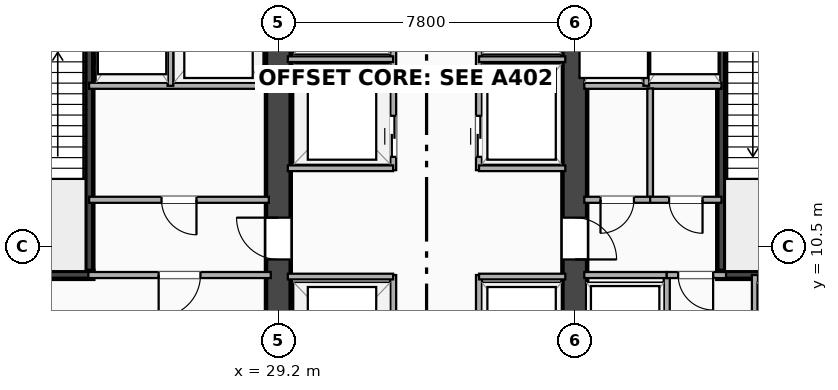
"""IFC4 building model, lengths in metres.
Left out: names, types, materials, properties, quantities, classifications, styles, units other than length and angle.
Written with IfcOpenShell. Run it as: python <this file> out.ifc"""

import sys

from ifc_helpers import new_model, si_unit, direction, frame, frame_2d, origin, place, context, subcontext, project, spatial, rectangle, extrude, element, fill, save


model = new_model("IFC4")
c1 = context("Model", 3, precision=1e-05, world=origin(), true_north=direction((0.0, 1.0)))
c2 = subcontext(c1, "Body", "Model", "MODEL_VIEW")
j1 = project(units=[si_unit("LENGTHUNIT", "METRE"), si_unit("PLANEANGLEUNIT", "RADIAN")], contexts=[c1])
p1 = place(None, origin())
s1 = spatial("IfcSite", under=j1, at=p1, CompositionType="ELEMENT")
p2 = place(p1, origin())
s2 = spatial("IfcBuilding", under=s1, at=p2, CompositionType="ELEMENT")
p3 = place(p2, origin())
s3 = spatial("IfcBuildingStorey", under=s2, at=p3, CompositionType="ELEMENT", Elevation=0.0)
p4 = place(p3, frame((29.2, 3.5, 0.0), z_axis=(0.0, 0.0, 1.0), x_axis=(0.0, 1.0, 0.0)))
e1 = element("IfcWall", 1, at=p4, inside=s3, PredefinedType="SHEAR", context=c2, shape_type="SweptSolid", body=[
    extrude(rectangle(XDim=16.9, YDim=0.65, at=frame_2d((8.45, 0.0))), origin(), (0.0, 0.0, 1.0), 5.1),
])
p5 = place(p4, frame((7.75, 0.0, 0.0), z_axis=(0.0, 0.0, 1.0), x_axis=(-1.0, 0.0, 0.0)))
e2 = element("IfcOpeningElement", 2, at=p5, cuts=e1, PredefinedType="OPENING", context=c2, shape_type="SweptSolid", body=[
    extrude(rectangle(XDim=1.1, YDim=2.15, at=frame_2d((0.55, 1.075))), frame((0.0, 0.335, 0.0), z_axis=(0.0, -1.0, 0.0), x_axis=(1.0, 0.0, 0.0)), (0.0, 0.0, 1.0), 0.67),
])
p6 = place(p3, frame((37.0, 3.5, 0.0), z_axis=(0.0, 0.0, 1.0), x_axis=(0.0, 1.0, 0.0)))
e3 = element("IfcWall", 3, at=p6, inside=s3, PredefinedType="SHEAR", context=c2, shape_type="SweptSolid", body=[
    extrude(rectangle(XDim=16.9, YDim=0.65, at=frame_2d((8.45, 0.0))), origin(), (0.0, 0.0, 1.0), 5.1),
])
p7 = place(p6, frame((6.65, 0.0, 0.0)))
e4 = element("IfcOpeningElement", 4, at=p7, cuts=e3, PredefinedType="OPENING", context=c2, shape_type="SweptSolid", body=[
    extrude(rectangle(XDim=1.1, YDim=2.15, at=frame_2d((0.55, 1.075))), frame((0.0, 0.335, 0.0), z_axis=(0.0, -1.0, 0.0), x_axis=(1.0, 0.0, 0.0)), (0.0, 0.0, 1.0), 0.67),
])
p8 = place(p3, frame((24.225, 9.745, 0.0), z_axis=(0.0, 0.0, 1.0), x_axis=(0.0, 1.0, 0.0)))
e5 = element("IfcWall", 5, at=p8, inside=s3, PredefinedType="SHEAR", context=c2, shape_type="SweptSolid", body=[
    extrude(rectangle(XDim=8.01, YDim=0.21, at=frame_2d((4.005, 0.0))), origin(), (0.0, 0.0, 1.0), 5.1),
])
p9 = place(p3, frame((20.67, 9.745, 0.0), z_axis=(0.0, 0.0, 1.0), x_axis=(1.0, 0.0, 0.0)))
e6 = element("IfcWall", 6, at=p9, inside=s3, PredefinedType="SHEAR", context=c2, shape_type="SweptSolid", body=[
    extrude(rectangle(XDim=3.66, YDim=0.21, at=frame_2d((1.83, 0.0))), origin(), (0.0, 0.0, 1.0), 5.1),
])
p10 = place(p3, frame((40.855, 9.745, 0.0), z_axis=(0.0, 0.0, 1.0), x_axis=(0.0, 1.0, 0.0)))
e7 = element("IfcWall", 7, at=p10, inside=s3, PredefinedType="SHEAR", context=c2, shape_type="SweptSolid", body=[
    extrude(rectangle(XDim=8.01, YDim=0.21, at=frame_2d((4.005, 0.0))), origin(), (0.0, 0.0, 1.0), 5.1),
])
p11 = place(p3, frame((40.75, 9.745, 0.0), z_axis=(0.0, 0.0, 1.0), x_axis=(1.0, 0.0, 0.0)))
e8 = element("IfcWall", 8, at=p11, inside=s3, PredefinedType="SHEAR", context=c2, shape_type="SweptSolid", body=[
    extrude(rectangle(XDim=3.66, YDim=0.21, at=frame_2d((1.83, 0.0))), origin(), (0.0, 0.0, 1.0), 5.1),
])
p12 = place(p3, frame((24.22, 14.72, 0.0), z_axis=(0.0, 0.0, 1.0), x_axis=(1.0, 0.0, 0.0)))
e9 = element("IfcWall", 9, at=p12, inside=s3, PredefinedType="PARTITIONING", context=c2, shape_type="SweptSolid", body=[
    extrude(rectangle(XDim=4.73, YDim=0.16, at=frame_2d((2.365, 0.0))), origin(), (0.0, 0.0, 1.0), 4.23),
])
p13 = place(p3, frame((26.36, 14.72, 0.0), z_axis=(0.0, 0.0, 1.0), x_axis=(0.0, 1.0, 0.0)))
e10 = element("IfcWall", 10, at=p13, inside=s3, PredefinedType="PARTITIONING", context=c2, shape_type="SweptSolid", body=[
    extrude(rectangle(XDim=3.04, YDim=0.15, at=frame_2d((1.52, 0.0))), origin(), (0.0, 0.0, 1.0), 5.1),
])
p14 = place(p3, frame((37.25, 14.72, 0.0), z_axis=(0.0, 0.0, 1.0), x_axis=(1.0, 0.0, 0.0)))
e11 = element("IfcWall", 11, at=p14, inside=s3, PredefinedType="PARTITIONING", context=c2, shape_type="SweptSolid", body=[
    extrude(rectangle(XDim=3.61, YDim=0.16, at=frame_2d((1.805, 0.0))), origin(), (0.0, 0.0, 1.0), 4.23),
])
p15 = place(p3, frame((38.88, 14.72, 0.0), z_axis=(0.0, 0.0, 1.0), x_axis=(0.0, 1.0, 0.0)))
e12 = element("IfcWall", 12, at=p15, inside=s3, PredefinedType="PARTITIONING", context=c2, shape_type="SweptSolid", body=[
    extrude(rectangle(XDim=3.04, YDim=0.15, at=frame_2d((1.52, 0.0))), origin(), (0.0, 0.0, 1.0), 5.1),
])
p16 = place(p3, frame((24.22, 11.72, 0.0), z_axis=(0.0, 0.0, 1.0), x_axis=(1.0, 0.0, 0.0)))
e13 = element("IfcWall", 13, at=p16, inside=s3, PredefinedType="PARTITIONING", context=c2, shape_type="SweptSolid", body=[
    extrude(rectangle(XDim=4.73, YDim=0.16, at=frame_2d((2.365, 0.0))), origin(), (0.0, 0.0, 1.0), 4.23),
])
p17 = place(p16, frame((1.905, 0.0, 0.0)))
e14 = element("IfcOpeningElement", 14, at=p17, cuts=e13, PredefinedType="OPENING", context=c2, shape_type="SweptSolid", body=[
    extrude(rectangle(XDim=0.92, YDim=2.08, at=frame_2d((0.46, 1.04))), frame((0.0, 0.09, 0.0), z_axis=(0.0, -1.0, 0.0), x_axis=(1.0, 0.0, 0.0)), (0.0, 0.0, 1.0), 0.18),
])
p18 = place(p3, frame((38.983, 11.72, 0.0), z_axis=(0.0, 0.0, 1.0), x_axis=(0.0, 1.0, 0.0)))
e15 = element("IfcWall", 15, at=p18, inside=s3, PredefinedType="PARTITIONING", context=c2, shape_type="SweptSolid", body=[
    extrude(rectangle(XDim=2.93, YDim=0.15, at=frame_2d((1.465, 0.0))), origin(), (0.0, 0.0, 1.0), 5.1),
])
p19 = place(p3, frame((37.25, 11.72, 0.0), z_axis=(0.0, 0.0, 1.0), x_axis=(1.0, 0.0, 0.0)))
e16 = element("IfcWall", 16, at=p19, inside=s3, PredefinedType="PARTITIONING", context=c2, shape_type="SweptSolid", body=[
    extrude(rectangle(XDim=1.733, YDim=0.16, at=frame_2d((0.866, 0.0))), origin(), (0.0, 0.0, 1.0), 4.23),
])
p20 = place(p19, frame((0.427, 0.0, 0.0)))
e17 = element("IfcOpeningElement", 17, at=p20, cuts=e16, PredefinedType="OPENING", context=c2, shape_type="SweptSolid", body=[
    extrude(rectangle(XDim=0.88, YDim=2.08, at=frame_2d((0.44, 1.04))), frame((0.0, 0.09, 0.0), z_axis=(0.0, -1.0, 0.0), x_axis=(1.0, 0.0, 0.0)), (0.0, 0.0, 1.0), 0.18),
])
p21 = place(p3, frame((38.983, 11.72, 0.0), z_axis=(0.0, 0.0, 1.0), x_axis=(1.0, 0.0, 0.0)))
e18 = element("IfcWall", 18, at=p21, inside=s3, PredefinedType="PARTITIONING", context=c2, shape_type="SweptSolid", body=[
    extrude(rectangle(XDim=1.877, YDim=0.16, at=frame_2d((0.938, 0.0))), origin(), (0.0, 0.0, 1.0), 5.1),
])
p22 = place(p21, frame((0.499, 0.0, 0.0)))
e19 = element("IfcOpeningElement", 19, at=p22, cuts=e18, PredefinedType="OPENING", context=c2, shape_type="SweptSolid", body=[
    extrude(rectangle(XDim=0.88, YDim=2.08, at=frame_2d((0.44, 1.04))), frame((0.0, 0.09, 0.0), z_axis=(0.0, -1.0, 0.0), x_axis=(1.0, 0.0, 0.0)), (0.0, 0.0, 1.0), 0.18),
])
p23 = place(p3, frame((24.2, 9.74, 0.0), z_axis=(0.0, 0.0, 1.0), x_axis=(1.0, 0.0, 0.0)))
e20 = element("IfcWall", 20, at=p23, inside=s3, PredefinedType="PARTITIONING", context=c2, shape_type="SweptSolid", body=[
    extrude(rectangle(XDim=4.8, YDim=0.16, at=frame_2d((2.4, 0.0))), origin(), (0.0, 0.0, 1.0), 4.23),
])
p24 = place(p23, frame((1.85, 0.0, 0.0)))
e21 = element("IfcOpeningElement", 21, at=p24, cuts=e20, PredefinedType="OPENING", context=c2, shape_type="SweptSolid", body=[
    extrude(rectangle(XDim=1.1, YDim=2.15, at=frame_2d((0.55, 1.075))), frame((0.0, 0.09, 0.0), z_axis=(0.0, -1.0, 0.0), x_axis=(1.0, 0.0, 0.0)), (0.0, 0.0, 1.0), 0.18),
])
p25 = place(p3, frame((39.42, 3.9, 0.0), z_axis=(0.0, 0.0, 1.0), x_axis=(0.0, 1.0, 0.0)))
e22 = element("IfcWall", 22, at=p25, inside=s3, PredefinedType="PARTITIONING", context=c2, shape_type="SweptSolid", body=[
    extrude(rectangle(XDim=5.84, YDim=0.16, at=frame_2d((2.92, 0.0))), origin(), (0.0, 0.0, 1.0), 4.164),
])
p26 = place(p25, frame((1.86, 0.0, 0.0), z_axis=(0.0, 0.0, 1.0), x_axis=(-1.0, 0.0, 0.0)))
e23 = element("IfcOpeningElement", 23, at=p26, cuts=e22, PredefinedType="OPENING", context=c2, shape_type="SweptSolid", body=[
    extrude(rectangle(XDim=1.06, YDim=2.16, at=frame_2d((0.53, 1.08))), frame((0.0, 0.09, 0.0), z_axis=(0.0, -1.0, 0.0), x_axis=(1.0, 0.0, 0.0)), (0.0, 0.0, 1.0), 0.18),
])
p27 = place(p25, frame((4.76, 0.0, 0.0), z_axis=(0.0, 0.0, 1.0), x_axis=(-1.0, 0.0, 0.0)))
e24 = element("IfcOpeningElement", 24, at=p27, cuts=e22, PredefinedType="OPENING", context=c2, shape_type="SweptSolid", body=[
    extrude(rectangle(XDim=1.06, YDim=2.16, at=frame_2d((0.53, 1.08))), frame((0.0, 0.09, 0.0), z_axis=(0.0, -1.0, 0.0), x_axis=(1.0, 0.0, 0.0)), (0.0, 0.0, 1.0), 0.18),
])
p28 = place(p3, frame((41.74, 3.9, 0.0), z_axis=(0.0, 0.0, 1.0), x_axis=(0.0, 1.0, 0.0)))
e25 = element("IfcWall", 25, at=p28, inside=s3, PredefinedType="PARTITIONING", context=c2, shape_type="SweptSolid", body=[
    extrude(rectangle(XDim=5.84, YDim=0.16, at=frame_2d((2.92, 0.0))), origin(), (0.0, 0.0, 1.0), 4.164),
])
p29 = place(p28, frame((0.8, 0.0, 0.0)))
e26 = element("IfcOpeningElement", 26, at=p29, cuts=e25, PredefinedType="OPENING", context=c2, shape_type="SweptSolid", body=[
    extrude(rectangle(XDim=1.06, YDim=2.16, at=frame_2d((0.53, 1.08))), frame((0.0, 0.09, 0.0), z_axis=(0.0, -1.0, 0.0), x_axis=(1.0, 0.0, 0.0)), (0.0, 0.0, 1.0), 0.18),
])
p30 = place(p28, frame((3.7, 0.0, 0.0)))
e27 = element("IfcOpeningElement", 27, at=p30, cuts=e25, PredefinedType="OPENING", context=c2, shape_type="SweptSolid", body=[
    extrude(rectangle(XDim=1.06, YDim=2.16, at=frame_2d((0.53, 1.08))), frame((0.0, 0.09, 0.0), z_axis=(0.0, -1.0, 0.0), x_axis=(1.0, 0.0, 0.0)), (0.0, 0.0, 1.0), 0.18),
])
p31 = place(p3, frame((37.25, 9.74, 0.0), z_axis=(0.0, 0.0, 1.0), x_axis=(1.0, 0.0, 0.0)))
e28 = element("IfcWall", 28, at=p31, inside=s3, PredefinedType="PARTITIONING", context=c2, shape_type="SweptSolid", body=[
    extrude(rectangle(XDim=2.17, YDim=0.16, at=frame_2d((1.085, 0.0))), origin(), (0.0, 0.0, 1.0), 4.23),
])
p32 = place(p3, frame((39.42, 9.74, 0.0), z_axis=(0.0, 0.0, 1.0), x_axis=(1.0, 0.0, 0.0)))
e29 = element("IfcWall", 29, at=p32, inside=s3, PredefinedType="PARTITIONING", context=c2, shape_type="SweptSolid", body=[
    extrude(rectangle(XDim=1.56, YDim=0.16, at=frame_2d((0.78, 0.0))), origin(), (0.0, 0.0, 1.0), 5.1),
])
p33 = place(p32, frame((0.3, 0.0, 0.0)))
e30 = element("IfcOpeningElement", 30, at=p33, cuts=e29, PredefinedType="OPENING", context=c2, shape_type="SweptSolid", body=[
    extrude(rectangle(XDim=0.92, YDim=2.08, at=frame_2d((0.46, 1.04))), frame((0.0, 0.09, 0.0), z_axis=(0.0, -1.0, 0.0), x_axis=(1.0, 0.0, 0.0)), (0.0, 0.0, 1.0), 0.18),
])
p34 = place(p3, frame((32.22, 3.9, 0.0), z_axis=(0.0, 0.0, 1.0), x_axis=(0.0, 1.0, 0.0)))
e31 = element("IfcWall", 31, at=p34, inside=s3, PredefinedType="PARTITIONING", context=c2, shape_type="SweptSolid", body=[
    extrude(rectangle(XDim=5.84, YDim=0.16, at=frame_2d((2.92, 0.0))), origin(), (0.0, 0.0, 1.0), 4.164),
])
p35 = place(p34, frame((1.78, 0.0, 0.0), z_axis=(0.0, 0.0, 1.0), x_axis=(-1.0, 0.0, 0.0)))
e32 = element("IfcOpeningElement", 32, at=p35, cuts=e31, PredefinedType="OPENING", context=c2, shape_type="SweptSolid", body=[
    extrude(rectangle(XDim=1.08, YDim=2.16, at=frame_2d((0.54, 1.08))), frame((0.0, 0.09, 0.0), z_axis=(0.0, -1.0, 0.0), x_axis=(1.0, 0.0, 0.0)), (0.0, 0.0, 1.0), 0.18),
])
p36 = place(p34, frame((4.68, 0.0, 0.0), z_axis=(0.0, 0.0, 1.0), x_axis=(-1.0, 0.0, 0.0)))
e33 = element("IfcOpeningElement", 33, at=p36, cuts=e31, PredefinedType="OPENING", context=c2, shape_type="SweptSolid", body=[
    extrude(rectangle(XDim=1.08, YDim=2.16, at=frame_2d((0.54, 1.08))), frame((0.0, 0.09, 0.0), z_axis=(0.0, -1.0, 0.0), x_axis=(1.0, 0.0, 0.0)), (0.0, 0.0, 1.0), 0.18),
])
p37 = place(p3, frame((34.48, 3.9, 0.0), z_axis=(0.0, 0.0, 1.0), x_axis=(0.0, 1.0, 0.0)))
e34 = element("IfcWall", 34, at=p37, inside=s3, PredefinedType="PARTITIONING", context=c2, shape_type="SweptSolid", body=[
    extrude(rectangle(XDim=5.84, YDim=0.16, at=frame_2d((2.92, 0.0))), origin(), (0.0, 0.0, 1.0), 4.164),
])
p38 = place(p37, frame((0.7, 0.0, 0.0)))
e35 = element("IfcOpeningElement", 35, at=p38, cuts=e34, PredefinedType="OPENING", context=c2, shape_type="SweptSolid", body=[
    extrude(rectangle(XDim=1.08, YDim=2.16, at=frame_2d((0.54, 1.08))), frame((0.0, 0.09, 0.0), z_axis=(0.0, -1.0, 0.0), x_axis=(1.0, 0.0, 0.0)), (0.0, 0.0, 1.0), 0.18),
])
p39 = place(p37, frame((3.6, 0.0, 0.0)))
e36 = element("IfcOpeningElement", 36, at=p39, cuts=e34, PredefinedType="OPENING", context=c2, shape_type="SweptSolid", body=[
    extrude(rectangle(XDim=1.08, YDim=2.16, at=frame_2d((0.54, 1.08))), frame((0.0, 0.09, 0.0), z_axis=(0.0, -1.0, 0.0), x_axis=(1.0, 0.0, 0.0)), (0.0, 0.0, 1.0), 0.18),
])
p40 = place(p3, frame((29.45, 9.7, 0.0), z_axis=(0.0, 0.0, 1.0), x_axis=(1.0, 0.0, 0.0)))
e37 = element("IfcWall", 37, at=p40, inside=s3, PredefinedType="PARTITIONING", context=c2, shape_type="SweptSolid", body=[
    extrude(rectangle(XDim=2.77, YDim=0.15, at=frame_2d((1.385, 0.0))), origin(), (0.0, 0.0, 1.0), 4.23),
])
p41 = place(p3, frame((34.48, 9.7, 0.0), z_axis=(0.0, 0.0, 1.0), x_axis=(1.0, 0.0, 0.0)))
e38 = element("IfcWall", 38, at=p41, inside=s3, PredefinedType="PARTITIONING", context=c2, shape_type="SweptSolid", body=[
    extrude(rectangle(XDim=2.27, YDim=0.15, at=frame_2d((1.135, 0.0))), origin(), (0.0, 0.0, 1.0), 4.23),
])
p42 = place(p3, frame((32.22, 12.5, 0.0), z_axis=(0.0, 0.0, 1.0), x_axis=(0.0, 1.0, 0.0)))
e39 = element("IfcWall", 39, at=p42, inside=s3, PredefinedType="PARTITIONING", context=c2, shape_type="SweptSolid", body=[
    extrude(rectangle(XDim=7.92, YDim=0.16, at=frame_2d((3.96, 0.0))), origin(), (0.0, 0.0, 1.0), 4.164),
])
p43 = place(p42, frame((1.43, 0.0, 0.0), z_axis=(0.0, 0.0, 1.0), x_axis=(-1.0, 0.0, 0.0)))
e40 = element("IfcOpeningElement", 40, at=p43, cuts=e39, PredefinedType="OPENING", context=c2, shape_type="SweptSolid", body=[
    extrude(rectangle(XDim=1.08, YDim=2.16, at=frame_2d((0.54, 1.08))), frame((0.0, 0.09, 0.0), z_axis=(0.0, -1.0, 0.0), x_axis=(1.0, 0.0, 0.0)), (0.0, 0.0, 1.0), 0.18),
])
p44 = place(p42, frame((4.33, 0.0, 0.0), z_axis=(0.0, 0.0, 1.0), x_axis=(-1.0, 0.0, 0.0)))
e41 = element("IfcOpeningElement", 41, at=p44, cuts=e39, PredefinedType="OPENING", context=c2, shape_type="SweptSolid", body=[
    extrude(rectangle(XDim=1.08, YDim=2.16, at=frame_2d((0.54, 1.08))), frame((0.0, 0.09, 0.0), z_axis=(0.0, -1.0, 0.0), x_axis=(1.0, 0.0, 0.0)), (0.0, 0.0, 1.0), 0.18),
])
p45 = place(p42, frame((6.1, 0.0, 0.0)))
e42 = element("IfcOpeningElement", 42, at=p45, cuts=e39, PredefinedType="OPENING", context=c2, shape_type="SweptSolid", body=[
    extrude(rectangle(XDim=0.88, YDim=2.08, at=frame_2d((0.44, 1.04))), frame((0.0, 0.09, 0.0), z_axis=(0.0, -1.0, 0.0), x_axis=(1.0, 0.0, 0.0)), (0.0, 0.0, 1.0), 0.18),
])
p46 = place(p3, frame((34.48, 12.5, 0.0), z_axis=(0.0, 0.0, 1.0), x_axis=(0.0, 1.0, 0.0)))
e43 = element("IfcWall", 43, at=p46, inside=s3, PredefinedType="PARTITIONING", context=c2, shape_type="SweptSolid", body=[
    extrude(rectangle(XDim=7.92, YDim=0.16, at=frame_2d((3.96, 0.0))), origin(), (0.0, 0.0, 1.0), 4.164),
])
p47 = place(p46, frame((0.35, 0.0, 0.0)))
e44 = element("IfcOpeningElement", 44, at=p47, cuts=e43, PredefinedType="OPENING", context=c2, shape_type="SweptSolid", body=[
    extrude(rectangle(XDim=1.08, YDim=2.16, at=frame_2d((0.54, 1.08))), frame((0.0, 0.09, 0.0), z_axis=(0.0, -1.0, 0.0), x_axis=(1.0, 0.0, 0.0)), (0.0, 0.0, 1.0), 0.18),
])
p48 = place(p46, frame((3.25, 0.0, 0.0)))
e45 = element("IfcOpeningElement", 45, at=p48, cuts=e43, PredefinedType="OPENING", context=c2, shape_type="SweptSolid", body=[
    extrude(rectangle(XDim=1.08, YDim=2.16, at=frame_2d((0.54, 1.08))), frame((0.0, 0.09, 0.0), z_axis=(0.0, -1.0, 0.0), x_axis=(1.0, 0.0, 0.0)), (0.0, 0.0, 1.0), 0.18),
])
p49 = place(p46, frame((6.98, 0.0, 0.0), z_axis=(0.0, 0.0, 1.0), x_axis=(-1.0, 0.0, 0.0)))
e46 = element("IfcOpeningElement", 46, at=p49, cuts=e43, PredefinedType="OPENING", context=c2, shape_type="SweptSolid", body=[
    extrude(rectangle(XDim=0.88, YDim=2.08, at=frame_2d((0.44, 1.04))), frame((0.0, 0.09, 0.0), z_axis=(0.0, -1.0, 0.0), x_axis=(1.0, 0.0, 0.0)), (0.0, 0.0, 1.0), 0.18),
])
p50 = place(p3, frame((29.45, 12.55, 0.0), z_axis=(0.0, 0.0, 1.0), x_axis=(1.0, 0.0, 0.0)))
e47 = element("IfcWall", 47, at=p50, inside=s3, PredefinedType="PARTITIONING", context=c2, shape_type="SweptSolid", body=[
    extrude(rectangle(XDim=2.77, YDim=0.15, at=frame_2d((1.385, 0.0))), origin(), (0.0, 0.0, 1.0), 4.23),
])
p51 = place(p3, frame((34.48, 12.55, 0.0), z_axis=(0.0, 0.0, 1.0), x_axis=(1.0, 0.0, 0.0)))
e48 = element("IfcWall", 48, at=p51, inside=s3, PredefinedType="PARTITIONING", context=c2, shape_type="SweptSolid", body=[
    extrude(rectangle(XDim=2.27, YDim=0.15, at=frame_2d((1.135, 0.0))), origin(), (0.0, 0.0, 1.0), 4.23),
])
p52 = place(p3, frame((29.45, 15.42, 0.0), z_axis=(0.0, 0.0, 1.0), x_axis=(1.0, 0.0, 0.0)))
e49 = element("IfcWall", 49, at=p52, inside=s3, PredefinedType="PARTITIONING", context=c2, shape_type="SweptSolid", body=[
    extrude(rectangle(XDim=2.77, YDim=0.15, at=frame_2d((1.385, 0.0))), origin(), (0.0, 0.0, 1.0), 4.23),
])
p53 = place(p3, frame((34.48, 15.42, 0.0), z_axis=(0.0, 0.0, 1.0), x_axis=(1.0, 0.0, 0.0)))
e50 = element("IfcWall", 50, at=p53, inside=s3, PredefinedType="PARTITIONING", context=c2, shape_type="SweptSolid", body=[
    extrude(rectangle(XDim=2.27, YDim=0.15, at=frame_2d((1.135, 0.0))), origin(), (0.0, 0.0, 1.0), 4.23),
])
p54 = place(p5, origin())
e51 = element("IfcDoor", 51, at=p54, inside=s3, OperationType="SINGLE_SWING_RIGHT", PredefinedType="DOOR", context=c2, shape_type="SweptSolid", body=[
    extrude(rectangle(XDim=1.1, YDim=2.15, at=frame_2d((0.55, 1.075))), frame((0.0, 0.025, 0.0), z_axis=(0.0, -1.0, 0.0), x_axis=(1.0, 0.0, 0.0)), (0.0, 0.0, 1.0), 0.05),
])
fill(e2, e51)
p55 = place(p7, origin())
e52 = element("IfcDoor", 52, at=p55, inside=s3, OperationType="SINGLE_SWING_LEFT", PredefinedType="DOOR", context=c2, shape_type="SweptSolid", body=[
    extrude(rectangle(XDim=1.1, YDim=2.15, at=frame_2d((0.55, 1.075))), frame((0.0, 0.025, 0.0), z_axis=(0.0, -1.0, 0.0), x_axis=(1.0, 0.0, 0.0)), (0.0, 0.0, 1.0), 0.05),
])
fill(e4, e52)
p56 = place(p17, origin())
e53 = element("IfcDoor", 53, at=p56, inside=s3, OperationType="SINGLE_SWING_RIGHT", PredefinedType="DOOR", context=c2, shape_type="SweptSolid", body=[
    extrude(rectangle(XDim=0.92, YDim=2.08, at=frame_2d((0.46, 1.04))), frame((0.0, 0.025, 0.0), z_axis=(0.0, -1.0, 0.0), x_axis=(1.0, 0.0, 0.0)), (0.0, 0.0, 1.0), 0.05),
])
fill(e14, e53)
p57 = place(p20, origin())
e54 = element("IfcDoor", 54, at=p57, inside=s3, OperationType="SINGLE_SWING_LEFT", PredefinedType="DOOR", context=c2, shape_type="SweptSolid", body=[
    extrude(rectangle(XDim=0.88, YDim=2.08, at=frame_2d((0.44, 1.04))), frame((0.0, 0.025, 0.0), z_axis=(0.0, -1.0, 0.0), x_axis=(1.0, 0.0, 0.0)), (0.0, 0.0, 1.0), 0.05),
])
fill(e17, e54)
p58 = place(p22, origin())
e55 = element("IfcDoor", 55, at=p58, inside=s3, OperationType="SINGLE_SWING_RIGHT", PredefinedType="DOOR", context=c2, shape_type="SweptSolid", body=[
    extrude(rectangle(XDim=0.88, YDim=2.08, at=frame_2d((0.44, 1.04))), frame((0.0, 0.025, 0.0), z_axis=(0.0, -1.0, 0.0), x_axis=(1.0, 0.0, 0.0)), (0.0, 0.0, 1.0), 0.05),
])
fill(e19, e55)
p59 = place(p24, origin())
e56 = element("IfcDoor", 56, at=p59, inside=s3, OperationType="SINGLE_SWING_LEFT", PredefinedType="DOOR", context=c2, shape_type="SweptSolid", body=[
    extrude(rectangle(XDim=1.1, YDim=2.15, at=frame_2d((0.55, 1.075))), frame((0.0, 0.025, 0.0), z_axis=(0.0, -1.0, 0.0), x_axis=(1.0, 0.0, 0.0)), (0.0, 0.0, 1.0), 0.05),
])
fill(e21, e56)
p60 = place(p33, origin())
e57 = element("IfcDoor", 57, at=p60, inside=s3, OperationType="SINGLE_SWING_RIGHT", PredefinedType="DOOR", context=c2, shape_type="SweptSolid", body=[
    extrude(rectangle(XDim=0.92, YDim=2.08, at=frame_2d((0.46, 1.04))), frame((0.0, 0.025, 0.0), z_axis=(0.0, -1.0, 0.0), x_axis=(1.0, 0.0, 0.0)), (0.0, 0.0, 1.0), 0.05),
])
fill(e30, e57)
p61 = place(p43, origin())
e58 = element("IfcDoor", 58, at=p61, inside=s3, OperationType="DOUBLE_DOOR_SLIDING", PredefinedType="DOOR", context=c2, shape_type="SweptSolid", body=[
    extrude(rectangle(XDim=1.08, YDim=2.16, at=frame_2d((0.54, 1.08))), frame((0.0, 0.025, 0.0), z_axis=(0.0, -1.0, 0.0), x_axis=(1.0, 0.0, 0.0)), (0.0, 0.0, 1.0), 0.05),
])
fill(e40, e58)
p62 = place(p47, origin())
e59 = element("IfcDoor", 59, at=p62, inside=s3, OperationType="DOUBLE_DOOR_SLIDING", PredefinedType="DOOR", context=c2, shape_type="SweptSolid", body=[
    extrude(rectangle(XDim=1.08, YDim=2.16, at=frame_2d((0.54, 1.08))), frame((0.0, 0.025, 0.0), z_axis=(0.0, -1.0, 0.0), x_axis=(1.0, 0.0, 0.0)), (0.0, 0.0, 1.0), 0.05),
])
fill(e44, e59)
save(model, sys.argv[1])
